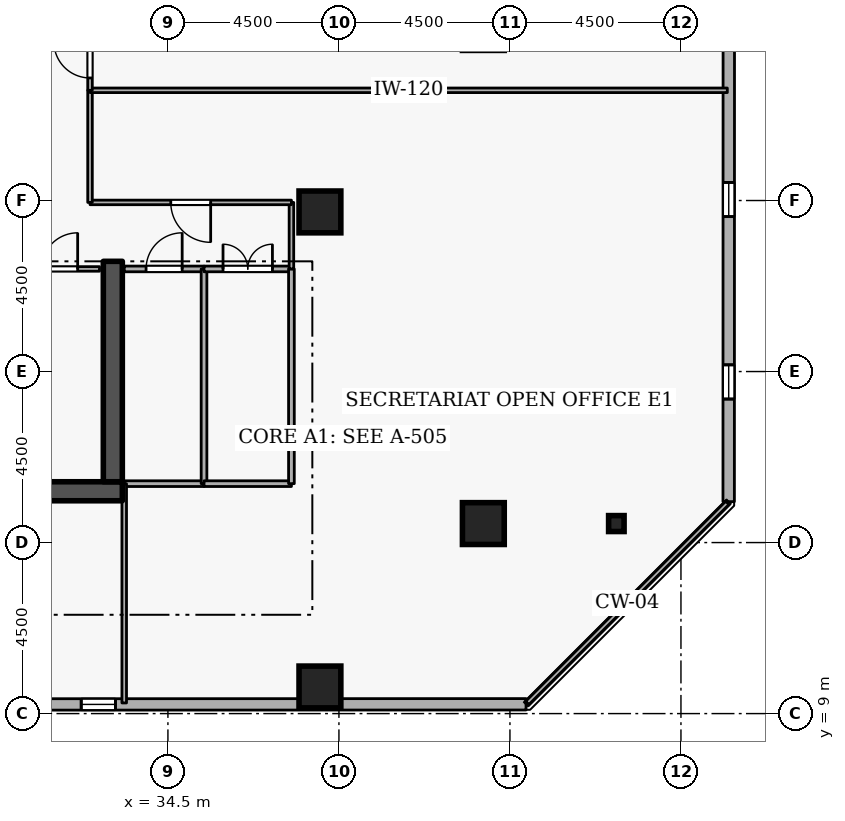
"""IFC4 building model, lengths in metres.
Left out: names, types, materials, properties, quantities, classifications, styles, units other than length and angle.
Written with IfcOpenShell. Run it as: python <this file> out.ifc"""

import sys

from ifc_helpers import new_model, si_unit, direction, frame, frame_2d, origin, origin_2d, place, context, subcontext, project, spatial, rectangle, i_section, extrude, element, fill, save


model = new_model("IFC4")
c1 = context("Model", 3, precision=1e-05, world=origin(), true_north=direction((0.0, 1.0)))
c2 = subcontext(c1, "Body", "Model", "MODEL_VIEW")
j1 = project(units=[si_unit("LENGTHUNIT", "METRE"), si_unit("PLANEANGLEUNIT", "RADIAN")], contexts=[c1])
p1 = place(None, origin())
s1 = spatial("IfcSite", under=j1, at=p1, CompositionType="ELEMENT")
p2 = place(p1, origin())
s2 = spatial("IfcBuilding", under=s1, at=p2, CompositionType="ELEMENT")
p3 = place(p2, frame((0.0, 0.0, 185.7)))
s3 = spatial("IfcBuildingStorey", under=s2, at=p3, CompositionType="ELEMENT", Elevation=185.7)
p4 = place(p3, frame((17.7, 14.85, 0.0), z_axis=(0.0, 0.0, 1.0), x_axis=(1.0, 0.0, 0.0)))
e1 = element("IfcWall", 1, at=p4, inside=s3, PredefinedType="SHEAR", context=c2, shape_type="SweptSolid", body=[
    extrude(rectangle(XDim=15.6, YDim=0.5, at=frame_2d((7.8, 0.0))), origin(), (0.0, 0.0, 1.0), 3.6),
])
p5 = place(p3, frame((33.05, 15.1, 0.0), z_axis=(0.0, 0.0, 1.0), x_axis=(0.0, 1.0, 0.0)))
e2 = element("IfcWall", 2, at=p5, inside=s3, PredefinedType="SHEAR", context=c2, shape_type="SweptSolid", body=[
    extrude(rectangle(XDim=5.8, YDim=0.5, at=frame_2d((2.9, 0.0))), origin(), (0.0, 0.0, 1.0), 3.6),
])
for number, where, z_axis, x_axis in (
    (3, (38.5, 9.7, 0.0), (0.0, 0.0, 1.0), (1.0, 0.0, 0.0)),
    (4, (42.8, 14.0, 0.0), (0.0, 0.0, 1.0), (1.0, 0.0, 0.0)),
    (5, (38.5, 22.2, 0.0), (0.0, 0.0, 1.0), (1.0, 0.0, 0.0)),
):
    element("IfcColumn", number, at=place(p3, frame(where, z_axis=z_axis, x_axis=x_axis)), inside=s3, PredefinedType="COLUMN", context=c2, shape_type="SweptSolid", body=[
        extrude(rectangle(XDim=1.1, YDim=1.1, at=origin_2d()), origin(), (0.0, 0.0, 1.0), 3.6),
    ])
p6 = place(p3, frame((46.3, 14.0, 0.0), z_axis=(0.0, 0.0, 1.0), x_axis=(1.0, 0.0, 0.0)))
e6 = element("IfcColumn", 6, at=p6, inside=s3, PredefinedType="COLUMN", context=c2, shape_type="SweptSolid", body=[
    extrude(i_section(OverallWidth=0.407, OverallDepth=0.419, WebThickness=0.031, FlangeThickness=0.049, FilletRadius=0.015, at=origin_2d()), origin(), (0.0, 0.0, 1.0), 3.6),
])
p7 = place(p3, frame((10.319, 9.235, 0.0), z_axis=(0.0, 0.0, 1.0), x_axis=(0.999999963872, 0.000268805477, 0.0)))
e7 = element("IfcWall", 7, at=p7, inside=s3, PredefinedType="STANDARD", context=c2, shape_type="SweptSolid", body=[
    extrude(rectangle(XDim=33.605, YDim=0.3, at=frame_2d((16.802, 0.0))), origin(), (0.0, 0.0, 1.0), 2.7),
])
p8 = place(p7, frame((7.5, 0.0, 0.72)))
e8 = element("IfcOpeningElement", 8, at=p8, cuts=e7, PredefinedType="OPENING", context=c2, shape_type="SweptSolid", body=[
    extrude(rectangle(XDim=0.9, YDim=1.75, at=frame_2d((0.45, 0.875))), frame((0.0, 0.16, 0.0), z_axis=(0.0, -1.0, 0.0), x_axis=(1.0, 0.0, 0.0)), (0.0, 0.0, 1.0), 0.32),
])
p9 = place(p7, frame((12.3, 0.0, 0.72)))
e9 = element("IfcOpeningElement", 9, at=p9, cuts=e7, PredefinedType="OPENING", context=c2, shape_type="SweptSolid", body=[
    extrude(rectangle(XDim=0.9, YDim=1.75, at=frame_2d((0.45, 0.875))), frame((0.0, 0.16, 0.0), z_axis=(0.0, -1.0, 0.0), x_axis=(1.0, 0.0, 0.0)), (0.0, 0.0, 1.0), 0.32),
])
p10 = place(p7, frame((17.1, 0.0, 0.72)))
e10 = element("IfcOpeningElement", 10, at=p10, cuts=e7, PredefinedType="OPENING", context=c2, shape_type="SweptSolid", body=[
    extrude(rectangle(XDim=0.9, YDim=1.75, at=frame_2d((0.45, 0.875))), frame((0.0, 0.16, 0.0), z_axis=(0.0, -1.0, 0.0), x_axis=(1.0, 0.0, 0.0)), (0.0, 0.0, 1.0), 0.32),
])
p11 = place(p7, frame((21.9, 0.0, 0.72)))
e11 = element("IfcOpeningElement", 11, at=p11, cuts=e7, PredefinedType="OPENING", context=c2, shape_type="SweptSolid", body=[
    extrude(rectangle(XDim=0.9, YDim=1.75, at=frame_2d((0.45, 0.875))), frame((0.0, 0.16, 0.0), z_axis=(0.0, -1.0, 0.0), x_axis=(1.0, 0.0, 0.0)), (0.0, 0.0, 1.0), 0.32),
])
p12 = place(p3, frame((49.256, 14.576, 0.0), z_axis=(0.0, 0.0, 1.0), x_axis=(0.000268805477, 0.999999963872, 0.0)))
e12 = element("IfcWall", 12, at=p12, inside=s3, PredefinedType="STANDARD", context=c2, shape_type="SweptSolid", body=[
    extrude(rectangle(XDim=33.605, YDim=0.3, at=frame_2d((16.802, 0.0))), origin(), (0.0, 0.0, 1.0), 2.7),
])
p13 = place(p12, frame((2.7, 0.0, 0.72)))
e13 = element("IfcOpeningElement", 13, at=p13, cuts=e12, PredefinedType="OPENING", context=c2, shape_type="SweptSolid", body=[
    extrude(rectangle(XDim=0.9, YDim=1.75, at=frame_2d((0.45, 0.875))), frame((0.0, 0.16, 0.0), z_axis=(0.0, -1.0, 0.0), x_axis=(1.0, 0.0, 0.0)), (0.0, 0.0, 1.0), 0.32),
])
p14 = place(p12, frame((7.5, 0.0, 0.72)))
e14 = element("IfcOpeningElement", 14, at=p14, cuts=e12, PredefinedType="OPENING", context=c2, shape_type="SweptSolid", body=[
    extrude(rectangle(XDim=0.9, YDim=1.75, at=frame_2d((0.45, 0.875))), frame((0.0, 0.16, 0.0), z_axis=(0.0, -1.0, 0.0), x_axis=(1.0, 0.0, 0.0)), (0.0, 0.0, 1.0), 0.32),
])
p15 = place(p12, frame((17.1, 0.0, 0.72)))
e15 = element("IfcOpeningElement", 15, at=p15, cuts=e12, PredefinedType="OPENING", context=c2, shape_type="SweptSolid", body=[
    extrude(rectangle(XDim=0.9, YDim=1.75, at=frame_2d((0.45, 0.875))), frame((0.0, 0.16, 0.0), z_axis=(0.0, -1.0, 0.0), x_axis=(1.0, 0.0, 0.0)), (0.0, 0.0, 1.0), 0.32),
])
p16 = place(p12, frame((21.9, 0.0, 0.72)))
e16 = element("IfcOpeningElement", 16, at=p16, cuts=e12, PredefinedType="OPENING", context=c2, shape_type="SweptSolid", body=[
    extrude(rectangle(XDim=0.9, YDim=1.75, at=frame_2d((0.45, 0.875))), frame((0.0, 0.16, 0.0), z_axis=(0.0, -1.0, 0.0), x_axis=(1.0, 0.0, 0.0)), (0.0, 0.0, 1.0), 0.32),
])
p17 = place(p12, frame((26.7, 0.0, 0.72)))
e17 = element("IfcOpeningElement", 17, at=p17, cuts=e12, PredefinedType="OPENING", context=c2, shape_type="SweptSolid", body=[
    extrude(rectangle(XDim=0.9, YDim=1.75, at=frame_2d((0.45, 0.875))), frame((0.0, 0.16, 0.0), z_axis=(0.0, -1.0, 0.0), x_axis=(1.0, 0.0, 0.0)), (0.0, 0.0, 1.0), 0.32),
])
p18 = place(p3, frame((30.6, 20.7, 0.0), z_axis=(0.0, 0.0, 1.0), x_axis=(1.0, 0.0, 0.0)))
e18 = element("IfcWall", 18, at=p18, inside=s3, PredefinedType="PARTITIONING", context=c2, shape_type="SweptSolid", body=[
    extrude(rectangle(XDim=2.1, YDim=0.12, at=frame_2d((1.05, 0.0))), origin(), (0.0, 0.0, 1.0), 3.34),
])
p19 = place(p18, frame((0.575, 0.0, 0.0)))
e19 = element("IfcOpeningElement", 19, at=p19, cuts=e18, PredefinedType="OPENING", context=c2, shape_type="SweptSolid", body=[
    extrude(rectangle(XDim=0.95, YDim=2.1, at=frame_2d((0.475, 1.05))), frame((0.0, 0.07, 0.0), z_axis=(0.0, -1.0, 0.0), x_axis=(1.0, 0.0, 0.0)), (0.0, 0.0, 1.0), 0.14),
])
p20 = place(p3, frame((35.45, 15.05, 0.0), z_axis=(0.0, 0.0, 1.0), x_axis=(-1.0, 0.0, 0.0)))
e20 = element("IfcWall", 20, at=p20, inside=s3, PredefinedType="PARTITIONING", context=c2, shape_type="SweptSolid", body=[
    extrude(rectangle(XDim=2.1, YDim=0.15, at=frame_2d((1.05, 0.0))), origin(), (0.0, 0.0, 1.0), 3.34),
])
p21 = place(p3, frame((33.35, 20.7, 0.0), z_axis=(0.0, 0.0, 1.0), x_axis=(1.0, 0.0, 0.0)))
e21 = element("IfcWall", 21, at=p21, inside=s3, PredefinedType="PARTITIONING", context=c2, shape_type="SweptSolid", body=[
    extrude(rectangle(XDim=2.1, YDim=0.15, at=frame_2d((1.05, 0.0))), origin(), (0.0, 0.0, 1.0), 3.34),
])
p22 = place(p21, frame((0.575, 0.0, 0.0)))
e22 = element("IfcOpeningElement", 22, at=p22, cuts=e21, PredefinedType="OPENING", context=c2, shape_type="SweptSolid", body=[
    extrude(rectangle(XDim=0.95, YDim=2.1, at=frame_2d((0.475, 1.05))), frame((0.0, 0.085, 0.0), z_axis=(0.0, -1.0, 0.0), x_axis=(1.0, 0.0, 0.0)), (0.0, 0.0, 1.0), 0.17),
])
p23 = place(p3, frame((35.45, 20.7, 0.0), z_axis=(0.0, 0.0, 1.0), x_axis=(0.0, -1.0, 0.0)))
e23 = element("IfcWall", 23, at=p23, inside=s3, PredefinedType="PARTITIONING", context=c2, shape_type="SweptSolid", body=[
    extrude(rectangle(XDim=5.65, YDim=0.15, at=frame_2d((2.825, 0.0))), origin(), (0.0, 0.0, 1.0), 3.34),
])
p24 = place(p3, frame((37.75, 15.05, 0.0), z_axis=(0.0, 0.0, 1.0), x_axis=(-1.0, 0.0, 0.0)))
e24 = element("IfcWall", 24, at=p24, inside=s3, PredefinedType="PARTITIONING", context=c2, shape_type="SweptSolid", body=[
    extrude(rectangle(XDim=2.3, YDim=0.15, at=frame_2d((1.15, 0.0))), origin(), (0.0, 0.0, 1.0), 3.34),
])
p25 = place(p3, frame((35.45, 20.7, 0.0), z_axis=(0.0, 0.0, 1.0), x_axis=(1.0, 0.0, 0.0)))
e25 = element("IfcWall", 25, at=p25, inside=s3, PredefinedType="PARTITIONING", context=c2, shape_type="SweptSolid", body=[
    extrude(rectangle(XDim=2.3, YDim=0.15, at=frame_2d((1.15, 0.0))), origin(), (0.0, 0.0, 1.0), 3.34),
])
p26 = place(p25, frame((0.5, 0.0, 0.0)))
e26 = element("IfcOpeningElement", 26, at=p26, cuts=e25, PredefinedType="OPENING", context=c2, shape_type="SweptSolid", body=[
    extrude(rectangle(XDim=1.3, YDim=2.12, at=frame_2d((0.65, 1.06))), frame((0.0, 0.085, 0.0), z_axis=(0.0, -1.0, 0.0), x_axis=(1.0, 0.0, 0.0)), (0.0, 0.0, 1.0), 0.17),
])
p27 = place(p3, frame((37.75, 20.7, 0.0), z_axis=(0.0, 0.0, 1.0), x_axis=(0.0, -1.0, 0.0)))
e27 = element("IfcWall", 27, at=p27, inside=s3, PredefinedType="PARTITIONING", context=c2, shape_type="SweptSolid", body=[
    extrude(rectangle(XDim=5.65, YDim=0.15, at=frame_2d((2.825, 0.0))), origin(), (0.0, 0.0, 1.0), 3.34),
])
p28 = place(p3, frame((37.75, 20.7, 0.0), z_axis=(0.0, 0.0, 1.0), x_axis=(0.0, 1.0, 0.0)))
e28 = element("IfcWall", 28, at=p28, inside=s3, PredefinedType="PARTITIONING", context=c2, shape_type="SweptSolid", body=[
    extrude(rectangle(XDim=1.75, YDim=0.12, at=frame_2d((0.875, 0.0))), origin(), (0.0, 0.0, 1.0), 3.34),
])
p29 = place(p3, frame((37.75, 22.45, 0.0), z_axis=(0.0, 0.0, 1.0), x_axis=(-1.0, 0.0, 0.0)))
e29 = element("IfcWall", 29, at=p29, inside=s3, PredefinedType="PARTITIONING", context=c2, shape_type="SweptSolid", body=[
    extrude(rectangle(XDim=5.3, YDim=0.12, at=frame_2d((2.65, 0.0))), origin(), (0.0, 0.0, 1.0), 3.34),
])
p30 = place(p29, frame((2.125, 0.0, 0.0)))
e30 = element("IfcOpeningElement", 30, at=p30, cuts=e29, PredefinedType="OPENING", context=c2, shape_type="SweptSolid", body=[
    extrude(rectangle(XDim=1.05, YDim=2.1, at=frame_2d((0.525, 1.05))), frame((0.0, 0.07, 0.0), z_axis=(0.0, -1.0, 0.0), x_axis=(1.0, 0.0, 0.0)), (0.0, 0.0, 1.0), 0.14),
])
p31 = place(p3, frame((32.45, 22.45, 0.0), z_axis=(0.0, 0.0, 1.0), x_axis=(0.0, 1.0, 0.0)))
e31 = element("IfcWall", 31, at=p31, inside=s3, PredefinedType="PARTITIONING", context=c2, shape_type="SweptSolid", body=[
    extrude(rectangle(XDim=2.95, YDim=0.12, at=frame_2d((1.475, 0.0))), origin(), (0.0, 0.0, 1.0), 3.34),
])
p32 = place(p3, frame((32.45, 25.4, 0.0), z_axis=(0.0, 0.0, 1.0), x_axis=(1.0, 0.0, 0.0)))
e32 = element("IfcWall", 32, at=p32, inside=s3, PredefinedType="PARTITIONING", context=c2, shape_type="SweptSolid", body=[
    extrude(rectangle(XDim=16.77, YDim=0.12, at=frame_2d((8.385, 0.0))), origin(), (0.0, 0.0, 1.0), 3.34),
])
p33 = place(p3, frame((49.22, 14.544, 0.0), z_axis=(0.0, 0.0, 1.0), x_axis=(-0.707106781187, -0.707106781187, 0.0)))
e33 = element("IfcWall", 33, at=p33, inside=s3, PredefinedType="PARTITIONING", context=c2, shape_type="SweptSolid", body=[
    extrude(rectangle(XDim=7.444, YDim=0.12, at=frame_2d((3.722, 0.0))), origin(), (0.0, 0.0, 1.0), 3.34),
])
p34 = place(p3, frame((33.35, 9.28, 0.0), z_axis=(0.0, 0.0, 1.0), x_axis=(0.0, 1.0, 0.0)))
e34 = element("IfcWall", 34, at=p34, inside=s3, PredefinedType="PARTITIONING", context=c2, shape_type="SweptSolid", body=[
    extrude(rectangle(XDim=5.77, YDim=0.12, at=frame_2d((2.885, 0.0))), origin(), (0.0, 0.0, 1.0), 2.545),
])
p35 = place(p3, frame((32.45, 25.4, 0.0), z_axis=(0.0, 0.0, 1.0), x_axis=(0.0, 1.0, 0.0)))
e35 = element("IfcWall", 35, at=p35, inside=s3, PredefinedType="PARTITIONING", context=c2, shape_type="SweptSolid", body=[
    extrude(rectangle(XDim=1.6, YDim=0.12, at=frame_2d((0.8, 0.0))), origin(), (0.0, 0.0, 1.0), 3.34),
])
p36 = place(p35, frame((0.325, 0.0, 0.0)))
e36 = element("IfcOpeningElement", 36, at=p36, cuts=e35, PredefinedType="OPENING", context=c2, shape_type="SweptSolid", body=[
    extrude(rectangle(XDim=0.95, YDim=2.1, at=frame_2d((0.475, 1.05))), frame((0.0, 0.07, 0.0), z_axis=(0.0, -1.0, 0.0), x_axis=(1.0, 0.0, 0.0)), (0.0, 0.0, 1.0), 0.14),
])
p37 = place(p11, origin())
e37 = element("IfcWindow", 37, at=p37, inside=s3, PartitioningType="SINGLE_PANEL", PredefinedType="WINDOW", context=c2, shape_type="SweptSolid", body=[
    extrude(rectangle(XDim=0.9, YDim=1.75, at=frame_2d((0.45, 0.875))), frame((0.0, 0.03, 0.0), z_axis=(0.0, -1.0, 0.0), x_axis=(1.0, 0.0, 0.0)), (0.0, 0.0, 1.0), 0.06),
])
fill(e11, e37)
p38 = place(p13, origin())
e38 = element("IfcWindow", 38, at=p38, inside=s3, PartitioningType="SINGLE_PANEL", PredefinedType="WINDOW", context=c2, shape_type="SweptSolid", body=[
    extrude(rectangle(XDim=0.9, YDim=1.75, at=frame_2d((0.45, 0.875))), frame((0.0, 0.03, 0.0), z_axis=(0.0, -1.0, 0.0), x_axis=(1.0, 0.0, 0.0)), (0.0, 0.0, 1.0), 0.06),
])
fill(e13, e38)
p39 = place(p14, origin())
e39 = element("IfcWindow", 39, at=p39, inside=s3, PartitioningType="SINGLE_PANEL", PredefinedType="WINDOW", context=c2, shape_type="SweptSolid", body=[
    extrude(rectangle(XDim=0.9, YDim=1.75, at=frame_2d((0.45, 0.875))), frame((0.0, 0.03, 0.0), z_axis=(0.0, -1.0, 0.0), x_axis=(1.0, 0.0, 0.0)), (0.0, 0.0, 1.0), 0.06),
])
fill(e14, e39)
p40 = place(p19, origin())
e40 = element("IfcDoor", 40, at=p40, inside=s3, OperationType="SINGLE_SWING_RIGHT", PredefinedType="DOOR", context=c2, shape_type="SweptSolid", body=[
    extrude(rectangle(XDim=0.95, YDim=2.1, at=frame_2d((0.475, 1.05))), frame((0.0, 0.025, 0.0), z_axis=(0.0, -1.0, 0.0), x_axis=(1.0, 0.0, 0.0)), (0.0, 0.0, 1.0), 0.05),
])
fill(e19, e40)
p41 = place(p22, origin())
e41 = element("IfcDoor", 41, at=p41, inside=s3, OperationType="SINGLE_SWING_RIGHT", PredefinedType="DOOR", context=c2, shape_type="SweptSolid", body=[
    extrude(rectangle(XDim=0.95, YDim=2.1, at=frame_2d((0.475, 1.05))), frame((0.0, 0.025, 0.0), z_axis=(0.0, -1.0, 0.0), x_axis=(1.0, 0.0, 0.0)), (0.0, 0.0, 1.0), 0.05),
])
fill(e22, e41)
p42 = place(p26, origin())
e42 = element("IfcDoor", 42, at=p42, inside=s3, OperationType="DOUBLE_DOOR_SINGLE_SWING", PredefinedType="DOOR", context=c2, shape_type="SweptSolid", body=[
    extrude(rectangle(XDim=1.3, YDim=2.12, at=frame_2d((0.65, 1.06))), frame((0.0, 0.025, 0.0), z_axis=(0.0, -1.0, 0.0), x_axis=(1.0, 0.0, 0.0)), (0.0, 0.0, 1.0), 0.05),
])
fill(e26, e42)
p43 = place(p30, origin())
e43 = element("IfcDoor", 43, at=p43, inside=s3, OperationType="SINGLE_SWING_LEFT", PredefinedType="DOOR", context=c2, shape_type="SweptSolid", body=[
    extrude(rectangle(XDim=1.05, YDim=2.1, at=frame_2d((0.525, 1.05))), frame((0.0, 0.025, 0.0), z_axis=(0.0, -1.0, 0.0), x_axis=(1.0, 0.0, 0.0)), (0.0, 0.0, 1.0), 0.05),
])
fill(e30, e43)
p44 = place(p36, origin())
e44 = element("IfcDoor", 44, at=p44, inside=s3, OperationType="SINGLE_SWING_RIGHT", PredefinedType="DOOR", context=c2, shape_type="SweptSolid", body=[
    extrude(rectangle(XDim=0.95, YDim=2.1, at=frame_2d((0.475, 1.05))), frame((0.0, 0.025, 0.0), z_axis=(0.0, -1.0, 0.0), x_axis=(1.0, 0.0, 0.0)), (0.0, 0.0, 1.0), 0.05),
])
fill(e36, e44)
save(model, sys.argv[1])
